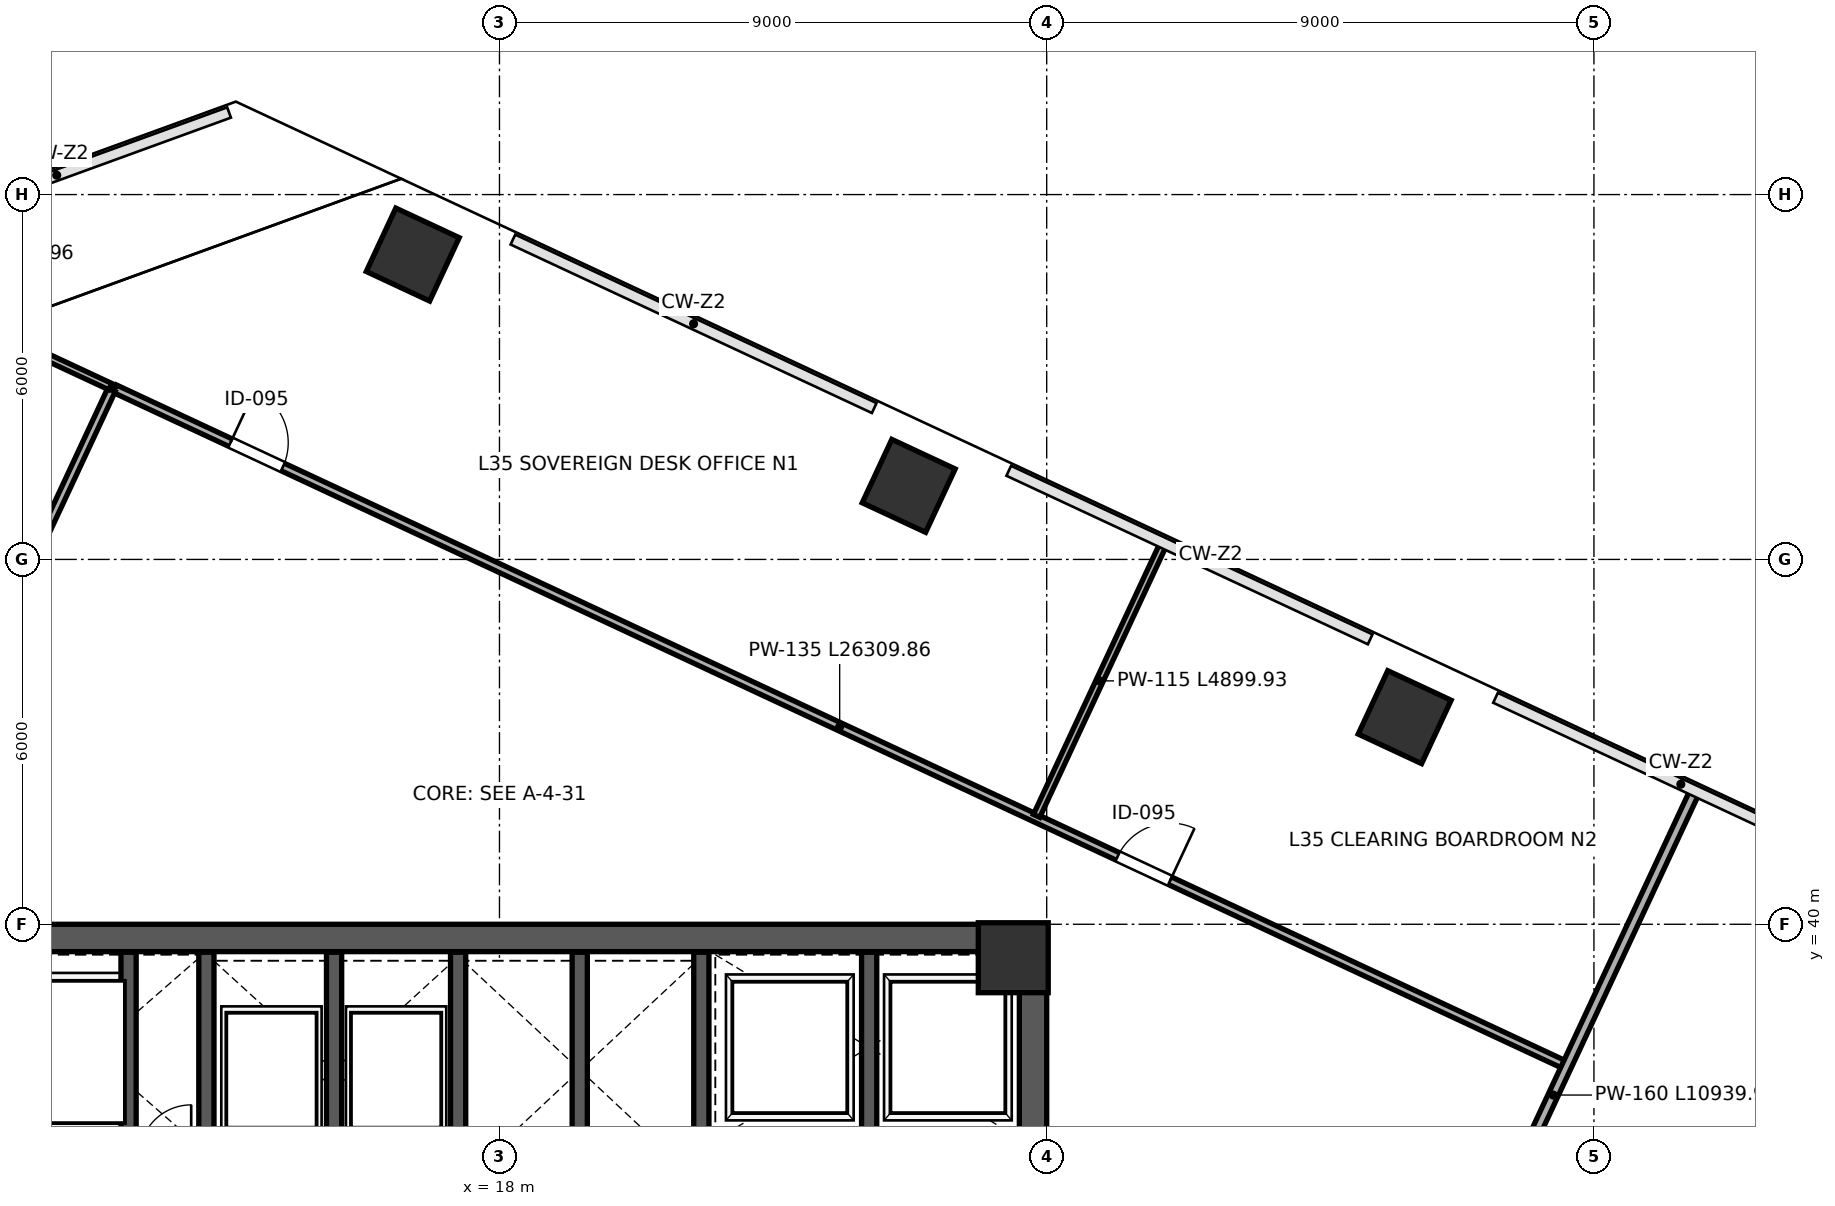
"""IFC4 building model, lengths in metres.
Left out: names, types, materials, properties, quantities, classifications, styles, units other than length and angle.
Written with IfcOpenShell. Run it as: python <this file> out.ifc"""

import sys

from ifc_helpers import new_model, si_unit, direction, frame, frame_2d, origin, origin_2d, place, context, subcontext, project, spatial, rectangle, extrude, clip, halfspace, source, transform, mapped, element, fill, save


model = new_model("IFC4")
c1 = context("Model", 3, precision=1e-05, world=origin(), true_north=direction((0.0, 1.0)))
c2 = subcontext(c1, "Body", "Model", "MODEL_VIEW")
j1 = project(units=[si_unit("LENGTHUNIT", "METRE"), si_unit("PLANEANGLEUNIT", "RADIAN")], contexts=[c1])
p1 = place(None, origin())
s1 = spatial("IfcSite", under=j1, at=p1, CompositionType="ELEMENT")
p2 = place(p1, origin())
s2 = spatial("IfcBuilding", under=s1, at=p2, CompositionType="ELEMENT")
p3 = place(p2, frame((0.0, 0.0, 158.2)))
s3 = spatial("IfcBuildingStorey", under=s2, at=p3, CompositionType="ELEMENT", Elevation=158.2)
m1 = source(origin(), c2, "Body", "SweptSolid", [
    extrude(rectangle(XDim=1.15, YDim=1.15, at=origin_2d()), origin(), (0.0, 0.0, 1.0), 4.198),
])
p4 = place(p3, frame((26.45, 39.45, 0.001), z_axis=(0.0, 0.0, 1.0), x_axis=(1.0, 0.0, 0.0)))
e1 = element("IfcColumn", 1, at=p4, inside=s3, PredefinedType="COLUMN", context=c2, shape_type="MappedRepresentation", body=[
    mapped(m1, transform((0.0, 0.0, 0.0), scale=1.0)),
])
p5 = place(p3, frame((16.574, 51.013, 0.0), z_axis=(0.098540759891, 0.024403873635, 0.994833739673), x_axis=(-0.190238417306, -0.980800009902, 0.04290320684)))
e2 = element("IfcColumn", 2, at=p5, inside=s3, PredefinedType="COLUMN", context=c2, shape_type="Clipping", body=[
    clip(clip(extrude(rectangle(XDim=1.15, YDim=1.15, at=origin_2d()), origin(), (0.0, 0.0, 1.0), 4.222), halfspace(frame((0.0, 0.0, 0.079), z_axis=(0.0, 0.0, -1.0), x_axis=(1.0, 0.0, 0.0)), False)), halfspace(frame((0.0, 0.0, 4.143), z_axis=(0.0, 0.0, 1.0), x_axis=(1.0, 0.0, 0.0)), False)),
])
p6 = place(p3, frame((24.731, 47.21, 0.0), z_axis=(0.078509951606, -0.017614040803, 0.996757710312), x_axis=(-0.609432467113, -0.792108426647, 0.034004535909)))
e3 = element("IfcColumn", 3, at=p6, inside=s3, PredefinedType="COLUMN", context=c2, shape_type="Clipping", body=[
    clip(clip(extrude(rectangle(XDim=1.15, YDim=1.15, at=origin_2d()), origin(), (0.0, 0.0, 1.0), 4.214), halfspace(frame((0.0, 0.0, 0.062), z_axis=(0.0, 0.0, -1.0), x_axis=(1.0, 0.0, 0.0)), False)), halfspace(frame((0.0, 0.0, 4.151), z_axis=(0.0, 0.0, 1.0), x_axis=(1.0, 0.0, 0.0)), False)),
])
p7 = place(p3, frame((32.887, 43.406, 0.0), z_axis=(0.058390097593, -0.059606557959, 0.996512746909), x_axis=(-0.942137163115, -0.333367736718, 0.035263550505)))
e4 = element("IfcColumn", 4, at=p7, inside=s3, PredefinedType="COLUMN", context=c2, shape_type="Clipping", body=[
    clip(clip(extrude(rectangle(XDim=1.15, YDim=1.15, at=origin_2d()), origin(), (0.0, 0.0, 1.0), 4.215), halfspace(frame((0.0, 0.0, 0.065), z_axis=(0.0, 0.0, -1.0), x_axis=(1.0, 0.0, 0.0)), False)), halfspace(frame((0.0, 0.0, 4.15), z_axis=(0.0, 0.0, 1.0), x_axis=(1.0, 0.0, 0.0)), False)),
])
p8 = place(p3, frame((9.61, 46.372, 0.0), z_axis=(0.074984591615, 0.060635688281, 0.995339451809), x_axis=(0.242783747421, -0.969223981277, 0.040754461182)))
e5 = element("IfcColumn", 5, at=p8, inside=s3, PredefinedType="PILASTER", context=c2, shape_type="Clipping", body=[
    clip(clip(extrude(rectangle(XDim=0.9, YDim=1.3, at=origin_2d()), origin(), (0.0, 0.0, 1.0), 4.22), halfspace(frame((0.0, 0.0, 0.076), z_axis=(0.0, 0.0, -1.0), x_axis=(1.0, 0.0, 0.0)), False)), halfspace(frame((0.0, 0.0, 4.144), z_axis=(0.0, 0.0, 1.0), x_axis=(1.0, 0.0, 0.0)), False)),
])
p9 = place(p3, frame((26.775, 24.45, 0.0), z_axis=(0.0, 0.0, 1.0), x_axis=(0.0, 1.0, 0.0)))
e6 = element("IfcWall", 6, at=p9, inside=s3, PredefinedType="SHEAR", context=c2, shape_type="SweptSolid", body=[
    extrude(rectangle(XDim=15.1, YDim=0.45, at=frame_2d((7.55, 0.0))), origin(), (0.0, 0.0, 1.0), 3.96),
])
p10 = place(p9, frame((8.6, 0.0, 0.0)))
e7 = element("IfcOpeningElement", 7, at=p10, cuts=e6, PredefinedType="OPENING", context=c2, shape_type="SweptSolid", body=[
    extrude(rectangle(XDim=1.15, YDim=2.2, at=frame_2d((0.575, 1.1))), frame((0.0, 0.235, 0.0), z_axis=(0.0, -1.0, 0.0), x_axis=(1.0, 0.0, 0.0)), (0.0, 0.0, 1.0), 0.47),
])
p11 = place(p3, frame((9.0, 39.775, 0.0), z_axis=(0.0, 0.0, 1.0), x_axis=(1.0, 0.0, 0.0)))
e8 = element("IfcWall", 8, at=p11, inside=s3, PredefinedType="SHEAR", context=c2, shape_type="SweptSolid", body=[
    extrude(rectangle(XDim=18.0, YDim=0.45, at=frame_2d((9.0, 0.0))), origin(), (0.0, 0.0, 1.0), 3.96),
])
p12 = place(p3, frame((21.32, 32.12, 0.0), z_axis=(0.0, 0.0, 1.0), x_axis=(0.0, 1.0, 0.0)))
e9 = element("IfcWall", 9, at=p12, inside=s3, PredefinedType="SHEAR", context=c2, shape_type="SweptSolid", body=[
    extrude(rectangle(XDim=7.42, YDim=0.25, at=frame_2d((3.71, 0.0))), origin(), (0.0, 0.0, 1.0), 3.96),
])
p13 = place(p12, frame((1.4, 0.0, 0.0)))
e10 = element("IfcOpeningElement", 10, at=p13, cuts=e9, PredefinedType="OPENING", context=c2, shape_type="SweptSolid", body=[
    extrude(rectangle(XDim=1.15, YDim=2.2, at=frame_2d((0.575, 1.1))), frame((0.0, 0.135, 0.0), z_axis=(0.0, -1.0, 0.0), x_axis=(1.0, 0.0, 0.0)), (0.0, 0.0, 1.0), 0.27),
])
p14 = place(p3, frame((11.9, 36.31, 0.0), z_axis=(0.0, 0.0, 1.0), x_axis=(0.0, 1.0, 0.0)))
e11 = element("IfcWall", 11, at=p14, inside=s3, PredefinedType="SHEAR", context=c2, shape_type="SweptSolid", body=[
    extrude(rectangle(XDim=3.23, YDim=0.25, at=frame_2d((1.615, 0.0))), origin(), (0.0, 0.0, 1.0), 3.96),
])
p15 = place(p3, frame((24.08, 36.48, 0.0), z_axis=(0.0, 0.0, 1.0), x_axis=(0.0, 1.0, 0.0)))
e12 = element("IfcWall", 12, at=p15, inside=s3, PredefinedType="SHEAR", context=c2, shape_type="SweptSolid", body=[
    extrude(rectangle(XDim=3.06, YDim=0.25, at=frame_2d((1.53, 0.0))), origin(), (0.0, 0.0, 1.0), 3.96),
])
for number, where, z_axis, x_axis in (
    (13, (13.18, 35.81, 0.0), (0.0, 0.0, 1.0), (0.0, 1.0, 0.0)),
    (14, (15.28, 35.81, 0.0), (0.0, 0.0, 1.0), (0.0, 1.0, 0.0)),
    (15, (17.32, 35.81, 0.0), (0.0, 0.0, 1.0), (0.0, 1.0, 0.0)),
    (16, (19.32, 35.81, 0.0), (0.0, 0.0, 1.0), (0.0, 1.0, 0.0)),
):
    element("IfcWall", number, at=place(p3, frame(where, z_axis=z_axis, x_axis=x_axis)), inside=s3, PredefinedType="SHEAR", context=c2, shape_type="SweptSolid", body=[
        extrude(rectangle(XDim=3.73, YDim=0.25, at=frame_2d((1.865, 0.0))), origin(), (0.0, 0.0, 1.0), 3.96),
    ])
p16 = place(p3, frame((11.673, 48.808, 0.0), z_axis=(0.0, 0.0, 1.0), x_axis=(0.906307085664, -0.422619765836, 0.0)))
e17 = element("IfcWall", 17, at=p16, inside=s3, PredefinedType="PARTITIONING", context=c2, shape_type="SweptSolid", body=[
    extrude(rectangle(XDim=26.31, YDim=0.135, at=frame_2d((13.155, 0.0))), origin(), (0.0, 0.0, 1.0), 3.96),
])
p17 = place(p16, frame((2.1, 0.0, 0.0)))
e18 = element("IfcOpeningElement", 18, at=p17, cuts=e17, PredefinedType="OPENING", context=c2, shape_type="SweptSolid", body=[
    extrude(rectangle(XDim=0.95, YDim=2.15, at=frame_2d((0.475, 1.075))), frame((0.0, 0.078, 0.0), z_axis=(0.0, -1.0, 0.0), x_axis=(1.0, 0.0, 0.0)), (0.0, 0.0, 1.0), 0.155),
])
p18 = place(p16, frame((18.2, 0.0, 0.0)))
e19 = element("IfcOpeningElement", 19, at=p18, cuts=e17, PredefinedType="OPENING", context=c2, shape_type="SweptSolid", body=[
    extrude(rectangle(XDim=0.95, YDim=2.15, at=frame_2d((0.475, 1.075))), frame((0.0, 0.078, 0.0), z_axis=(0.0, -1.0, 0.0), x_axis=(1.0, 0.0, 0.0)), (0.0, 0.0, 1.0), 0.155),
])
p19 = place(p3, frame((26.834, 41.782, 0.0), z_axis=(0.0, 0.0, 1.0), x_axis=(0.422631768009, 0.906301488838, 0.0)))
e20 = element("IfcWall", 20, at=p19, inside=s3, PredefinedType="PARTITIONING", context=c2, shape_type="SweptSolid", body=[
    extrude(rectangle(XDim=4.9, YDim=0.115, at=frame_2d((2.45, 0.0))), origin(), (0.0, 0.0, 1.0), 3.195),
])
p20 = place(p3, frame((1.756, 27.635, 0.0), z_axis=(0.0, 0.0, 1.0), x_axis=(0.422615732035, 0.906308966653, 0.0)))
e21 = element("IfcWall", 21, at=p20, inside=s3, PredefinedType="PARTITIONING", context=c2, shape_type="SweptSolid", body=[
    extrude(rectangle(XDim=23.34, YDim=0.135, at=frame_2d((11.67, 0.0))), origin(), (0.0, 0.0, 1.0), 3.96),
])
p21 = place(p20, frame((1.3, 0.0, 0.0)))
e22 = element("IfcOpeningElement", 22, at=p21, cuts=e21, PredefinedType="OPENING", context=c2, shape_type="SweptSolid", body=[
    extrude(rectangle(XDim=0.95, YDim=2.15, at=frame_2d((0.475, 1.075))), frame((0.0, 0.078, 0.0), z_axis=(0.0, -1.0, 0.0), x_axis=(1.0, 0.0, 0.0)), (0.0, 0.0, 1.0), 0.155),
])
p22 = place(p20, frame((9.4, 0.0, 0.0)))
e23 = element("IfcOpeningElement", 23, at=p22, cuts=e21, PredefinedType="OPENING", context=c2, shape_type="SweptSolid", body=[
    extrude(rectangle(XDim=0.95, YDim=2.15, at=frame_2d((0.475, 1.075))), frame((0.0, 0.078, 0.0), z_axis=(0.0, -1.0, 0.0), x_axis=(1.0, 0.0, 0.0)), (0.0, 0.0, 1.0), 0.155),
])
p23 = place(p3, frame((7.585, 50.714, 0.0), z_axis=(0.0, 0.0, 1.0), x_axis=(0.906295742894, -0.422644089526, 0.0)))
e24 = element("IfcWall", 24, at=p23, inside=s3, PredefinedType="PARTITIONING", context=c2, shape_type="SweptSolid", body=[
    extrude(rectangle(XDim=4.43, YDim=0.115, at=frame_2d((2.215, 0.0))), origin(), (0.0, 0.0, 1.0), 3.96),
])
p24 = place(p3, frame((33.018, 32.234, 0.0), z_axis=(0.0, 0.0, 1.0), x_axis=(0.422624006235, 0.906305108313, 0.0)))
e25 = element("IfcWall", 25, at=p24, inside=s3, PredefinedType="PARTITIONING", context=c2, shape_type="SweptSolid", body=[
    extrude(rectangle(XDim=10.94, YDim=0.16, at=frame_2d((5.47, 0.0))), origin(), (0.0, 0.0, 1.0), 3.195),
])
m2 = source(origin(), c2, "Body", "SweptSolid", [
    extrude(rectangle(XDim=0.95, YDim=2.15, at=frame_2d((0.475, 1.075))), frame((0.0, 0.025, 0.0), z_axis=(0.0, -1.0, 0.0), x_axis=(1.0, 0.0, 0.0)), (0.0, 0.0, 1.0), 0.05),
])
p25 = place(p17, origin())
e26 = element("IfcDoor", 26, at=p25, inside=s3, OperationType="SINGLE_SWING_LEFT", PredefinedType="DOOR", context=c2, shape_type="MappedRepresentation", body=[
    mapped(m2, transform((0.0, 0.0, 0.0), scale=1.0)),
])
fill(e18, e26)
p26 = place(p18, origin())
e27 = element("IfcDoor", 27, at=p26, inside=s3, OperationType="SINGLE_SWING_RIGHT", PredefinedType="DOOR", context=c2, shape_type="MappedRepresentation", body=[
    mapped(m2, transform((0.0, 0.0, 0.0), scale=1.0)),
])
fill(e19, e27)
save(model, sys.argv[1])
